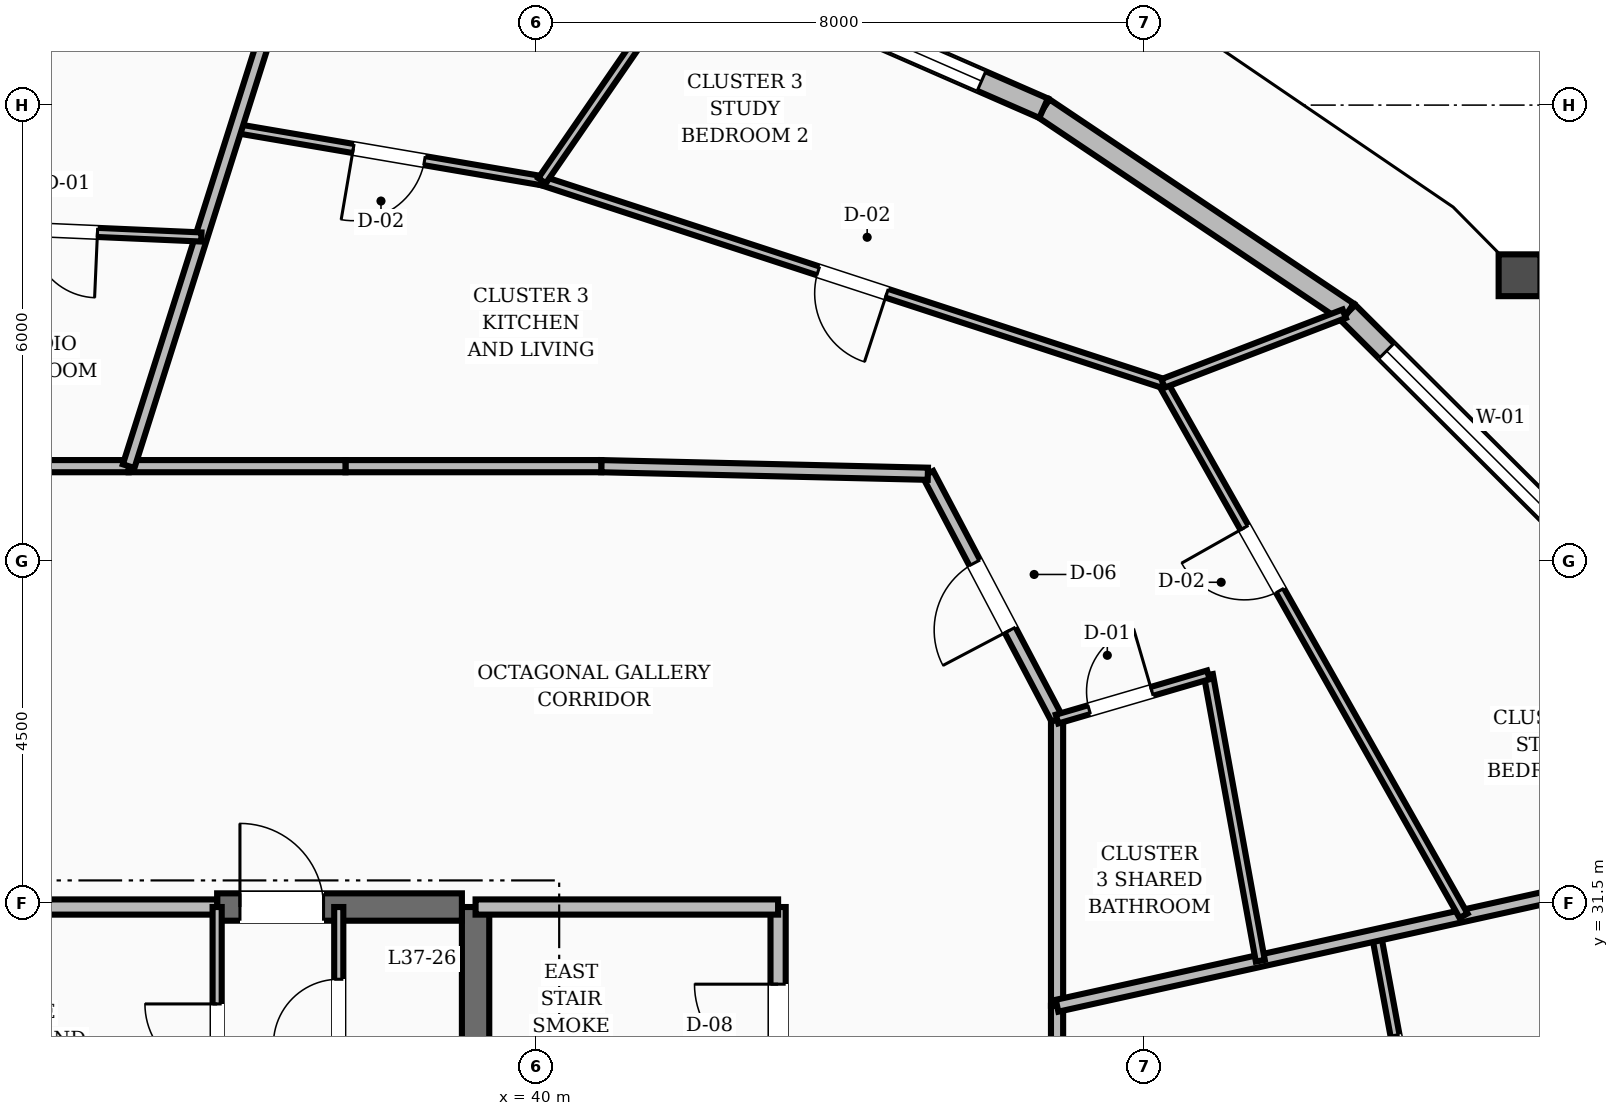
"""IFC4 building model, lengths in metres.
Left out: names, types, materials, properties, quantities, classifications, styles, units other than length and angle.
Written with IfcOpenShell. Run it as: python <this file> out.ifc"""

import sys

from ifc_helpers import new_model, si_unit, direction, frame, frame_2d, origin, place, context, subcontext, project, spatial, rectangle, extrude, element, fill, save


model = new_model("IFC4")
c1 = context("Model", 3, precision=1e-05, world=origin(), true_north=direction((0.0, 1.0)))
c2 = subcontext(c1, "Body", "Model", "MODEL_VIEW")
j1 = project(units=[si_unit("LENGTHUNIT", "METRE"), si_unit("PLANEANGLEUNIT", "RADIAN")], contexts=[c1])
p1 = place(None, origin())
s1 = spatial("IfcSite", under=j1, at=p1, CompositionType="ELEMENT")
p2 = place(p1, origin())
s2 = spatial("IfcBuilding", under=s1, at=p2, CompositionType="ELEMENT")
p3 = place(p2, frame((0.0, 0.0, 146.0)))
s3 = spatial("IfcBuildingStorey", under=s2, at=p3, CompositionType="ELEMENT", Elevation=146.0)
p4 = place(p3, frame((39.2, 25.15, 0.0), z_axis=(0.0, 0.0, 1.0), x_axis=(0.0, 1.0, 0.0)))
e1 = element("IfcWall", 1, at=p4, inside=s3, PredefinedType="SHEAR", context=c2, shape_type="SweptSolid", body=[
    extrude(rectangle(XDim=6.3, YDim=0.36, at=frame_2d((3.15, 0.0))), origin(), (0.0, 0.0, 1.0), 3.6),
])
p5 = place(p3, frame((35.8, 31.45, 0.0), z_axis=(0.0, 0.0, 1.0), x_axis=(1.0, 0.0, 0.0)))
e2 = element("IfcWall", 2, at=p5, inside=s3, PredefinedType="SHEAR", context=c2, shape_type="SweptSolid", body=[
    extrude(rectangle(XDim=3.22, YDim=0.36, at=frame_2d((1.61, 0.0))), origin(), (0.0, 0.0, 1.0), 3.6),
])
p6 = place(p5, frame((0.3, 0.0, 0.0)))
e3 = element("IfcOpeningElement", 3, at=p6, cuts=e2, PredefinedType="OPENING", context=c2, shape_type="SweptSolid", body=[
    extrude(rectangle(XDim=1.1, YDim=2.1, at=frame_2d((0.55, 1.05))), frame((0.0, 0.19, 0.0), z_axis=(0.0, -1.0, 0.0), x_axis=(1.0, 0.0, 0.0)), (0.0, 0.0, 1.0), 0.38),
])
p7 = place(p3, frame((53.959, 36.0, 0.0), z_axis=(0.0, 0.0, 1.0), x_axis=(-0.708343047993, 0.70586834917, 0.0)))
e4 = element("IfcWall", 4, at=p7, inside=s3, PredefinedType="STANDARD", context=c2, shape_type="SweptSolid", body=[
    extrude(rectangle(XDim=4.637, YDim=0.28, at=frame_2d((2.318, 0.0))), origin(), (0.0, 0.0, 1.0), 2.82),
])
p8 = place(p7, frame((0.719, 0.0, 0.8)))
e5 = element("IfcOpeningElement", 5, at=p8, cuts=e4, PredefinedType="OPENING", context=c2, shape_type="SweptSolid", body=[
    extrude(rectangle(XDim=3.2, YDim=1.65, at=frame_2d((1.6, 0.825))), frame((0.0, 0.15, 0.0), z_axis=(0.0, -1.0, 0.0), x_axis=(1.0, 0.0, 0.0)), (0.0, 0.0, 1.0), 0.3),
])
p9 = place(p3, frame((50.675, 39.273, 0.0), z_axis=(0.0, 0.0, 1.0), x_axis=(-0.830308520581, 0.557304010977, 0.0)))
e6 = element("IfcWall", 6, at=p9, inside=s3, PredefinedType="STANDARD", context=c2, shape_type="SweptSolid", body=[
    extrude(rectangle(XDim=4.82, YDim=0.28, at=frame_2d((2.41, 0.0))), origin(), (0.0, 0.0, 1.0), 2.82),
])
p10 = place(p3, frame((46.673, 41.959, 0.0), z_axis=(0.0, 0.0, 1.0), x_axis=(-0.916285475586, 0.400525813438, 0.0)))
e7 = element("IfcWall", 7, at=p10, inside=s3, PredefinedType="STANDARD", context=c2, shape_type="SweptSolid", body=[
    extrude(rectangle(XDim=4.983, YDim=0.28, at=frame_2d((2.492, 0.0))), origin(), (0.0, 0.0, 1.0), 2.82),
])
p11 = place(p10, frame((0.892, 0.0, 0.8)))
e8 = element("IfcOpeningElement", 8, at=p11, cuts=e7, PredefinedType="OPENING", context=c2, shape_type="SweptSolid", body=[
    extrude(rectangle(XDim=3.2, YDim=1.65, at=frame_2d((1.6, 0.825))), frame((0.0, 0.15, 0.0), z_axis=(0.0, -1.0, 0.0), x_axis=(1.0, 0.0, 0.0)), (0.0, 0.0, 1.0), 0.3),
])
p12 = place(p3, frame((43.18, 28.32, 0.0), z_axis=(0.0, 0.0, 1.0), x_axis=(0.0, 1.0, 0.0)))
e9 = element("IfcWall", 9, at=p12, inside=s3, PredefinedType="SOLIDWALL", context=c2, shape_type="SweptSolid", body=[
    extrude(rectangle(XDim=3.13, YDim=0.2, at=frame_2d((1.565, 0.0))), origin(), (0.0, 0.0, 1.0), 2.8),
])
p13 = place(p12, frame((1.015, 0.0, 0.0)))
e10 = element("IfcOpeningElement", 10, at=p13, cuts=e9, PredefinedType="OPENING", context=c2, shape_type="SweptSolid", body=[
    extrude(rectangle(XDim=1.1, YDim=2.1, at=frame_2d((0.55, 1.05))), frame((0.0, 0.11, 0.0), z_axis=(0.0, -1.0, 0.0), x_axis=(1.0, 0.0, 0.0)), (0.0, 0.0, 1.0), 0.22),
])
p14 = place(p3, frame((39.2, 31.45, 0.0), z_axis=(0.0, 0.0, 1.0), x_axis=(1.0, 0.0, 0.0)))
e11 = element("IfcWall", 11, at=p14, inside=s3, PredefinedType="SOLIDWALL", context=c2, shape_type="SweptSolid", body=[
    extrude(rectangle(XDim=3.98, YDim=0.2, at=frame_2d((1.99, 0.0))), origin(), (0.0, 0.0, 1.0), 2.8),
])
p15 = place(p3, frame((28.2, 31.45, 0.0), z_axis=(0.0, 0.0, 1.0), x_axis=(1.0, 0.0, 0.0)))
e12 = element("IfcWall", 12, at=p15, inside=s3, PredefinedType="SOLIDWALL", context=c2, shape_type="SweptSolid", body=[
    extrude(rectangle(XDim=7.6, YDim=0.2, at=frame_2d((3.8, 0.0))), origin(), (0.0, 0.0, 1.0), 2.8),
])
p16 = place(p15, frame((1.0, 0.0, 0.0)))
e13 = element("IfcOpeningElement", 13, at=p16, cuts=e12, PredefinedType="OPENING", context=c2, shape_type="SweptSolid", body=[
    extrude(rectangle(XDim=0.95, YDim=2.1, at=frame_2d((0.475, 1.05))), frame((0.0, 0.11, 0.0), z_axis=(0.0, -1.0, 0.0), x_axis=(1.0, 0.0, 0.0)), (0.0, 0.0, 1.0), 0.22),
])
p17 = place(p3, frame((35.8, 27.95, 0.0), z_axis=(0.0, 0.0, 1.0), x_axis=(0.0, 1.0, 0.0)))
e14 = element("IfcWall", 14, at=p17, inside=s3, PredefinedType="PARTITIONING", context=c2, shape_type="SweptSolid", body=[
    extrude(rectangle(XDim=3.5, YDim=0.12, at=frame_2d((1.75, 0.0))), origin(), (0.0, 0.0, 1.0), 2.8),
])
p18 = place(p17, frame((1.275, 0.0, 0.0)))
e15 = element("IfcOpeningElement", 15, at=p18, cuts=e14, PredefinedType="OPENING", context=c2, shape_type="SweptSolid", body=[
    extrude(rectangle(XDim=0.95, YDim=2.1, at=frame_2d((0.475, 1.05))), frame((0.0, 0.07, 0.0), z_axis=(0.0, -1.0, 0.0), x_axis=(1.0, 0.0, 0.0)), (0.0, 0.0, 1.0), 0.14),
])
p19 = place(p3, frame((37.4, 25.25, 0.0), z_axis=(0.0, 0.0, 1.0), x_axis=(0.0, 1.0, 0.0)))
e16 = element("IfcWall", 16, at=p19, inside=s3, PredefinedType="PARTITIONING", context=c2, shape_type="SweptSolid", body=[
    extrude(rectangle(XDim=6.2, YDim=0.12, at=frame_2d((3.1, 0.0))), origin(), (0.0, 0.0, 1.0), 2.8),
])
p20 = place(p19, frame((0.44, 0.0, 0.0)))
e17 = element("IfcOpeningElement", 17, at=p20, cuts=e16, PredefinedType="OPENING", context=c2, shape_type="SweptSolid", body=[
    extrude(rectangle(XDim=0.86, YDim=2.1, at=frame_2d((0.43, 1.05))), frame((0.0, 0.07, 0.0), z_axis=(0.0, -1.0, 0.0), x_axis=(1.0, 0.0, 0.0)), (0.0, 0.0, 1.0), 0.14),
])
p21 = place(p19, frame((2.37, 0.0, 0.0)))
e18 = element("IfcOpeningElement", 18, at=p21, cuts=e16, PredefinedType="OPENING", context=c2, shape_type="SweptSolid", body=[
    extrude(rectangle(XDim=0.86, YDim=2.1, at=frame_2d((0.43, 1.05))), frame((0.0, 0.07, 0.0), z_axis=(0.0, -1.0, 0.0), x_axis=(1.0, 0.0, 0.0)), (0.0, 0.0, 1.0), 0.14),
])
p22 = place(p19, frame((4.39, 0.0, 0.0)))
e19 = element("IfcOpeningElement", 19, at=p22, cuts=e16, PredefinedType="OPENING", context=c2, shape_type="SweptSolid", body=[
    extrude(rectangle(XDim=0.86, YDim=2.1, at=frame_2d((0.43, 1.05))), frame((0.0, 0.07, 0.0), z_axis=(0.0, -1.0, 0.0), x_axis=(1.0, 0.0, 0.0)), (0.0, 0.0, 1.0), 0.14),
])
p23 = place(p3, frame((46.85, 26.954, 0.0), z_axis=(0.0, 0.0, 1.0), x_axis=(0.0, 1.0, 0.0)))
e20 = element("IfcWall", 20, at=p23, inside=s3, PredefinedType="SOLIDWALL", context=c2, shape_type="SweptSolid", body=[
    extrude(rectangle(XDim=3.197, YDim=0.16, at=frame_2d((1.599, 0.0))), origin(), (0.0, 0.0, 1.0), 2.8),
])
p24 = place(p3, frame((46.85, 30.151, 0.0), z_axis=(0.0, 0.0, 1.0), x_axis=(0.0, 1.0, 0.0)))
e21 = element("IfcWall", 21, at=p24, inside=s3, PredefinedType="SOLIDWALL", context=c2, shape_type="SweptSolid", body=[
    extrude(rectangle(XDim=3.771, YDim=0.16, at=frame_2d((1.886, 0.0))), origin(), (0.0, 0.0, 1.0), 2.8),
])
p25 = place(p3, frame((46.85, 33.923, 0.0), z_axis=(0.0, 0.0, 1.0), x_axis=(-0.466093963429, 0.884735224378, 0.0)))
e22 = element("IfcWall", 22, at=p25, inside=s3, PredefinedType="SOLIDWALL", context=c2, shape_type="SweptSolid", body=[
    extrude(rectangle(XDim=3.648, YDim=0.16, at=frame_2d((1.824, 0.0))), origin(), (0.0, 0.0, 1.0), 2.8),
])
p26 = place(p25, frame((1.324, 0.0, 0.0)))
e23 = element("IfcOpeningElement", 23, at=p26, cuts=e22, PredefinedType="OPENING", context=c2, shape_type="SweptSolid", body=[
    extrude(rectangle(XDim=1.0, YDim=2.1, at=frame_2d((0.5, 1.05))), frame((0.0, 0.09, 0.0), z_axis=(0.0, -1.0, 0.0), x_axis=(1.0, 0.0, 0.0)), (0.0, 0.0, 1.0), 0.18),
])
p27 = place(p3, frame((45.15, 37.15, 0.0), z_axis=(0.0, 0.0, 1.0), x_axis=(-0.999728709658, 0.023291781507, 0.0)))
e24 = element("IfcWall", 24, at=p27, inside=s3, PredefinedType="SOLIDWALL", context=c2, shape_type="SweptSolid", body=[
    extrude(rectangle(XDim=4.298, YDim=0.16, at=frame_2d((2.149, 0.0))), origin(), (0.0, 0.0, 1.0), 2.8),
])
p28 = place(p3, frame((40.854, 37.25, 0.0), z_axis=(0.0, 0.0, 1.0), x_axis=(-1.0, 0.0, 0.0)))
e25 = element("IfcWall", 25, at=p28, inside=s3, PredefinedType="SOLIDWALL", context=c2, shape_type="SweptSolid", body=[
    extrude(rectangle(XDim=3.365, YDim=0.16, at=frame_2d((1.683, 0.0))), origin(), (0.0, 0.0, 1.0), 2.8),
])
p29 = place(p3, frame((37.488, 37.25, 0.0), z_axis=(0.0, 0.0, 1.0), x_axis=(-1.0, 0.0, 0.0)))
e26 = element("IfcWall", 26, at=p29, inside=s3, PredefinedType="SOLIDWALL", context=c2, shape_type="SweptSolid", body=[
    extrude(rectangle(XDim=2.853, YDim=0.16, at=frame_2d((1.426, 0.0))), origin(), (0.0, 0.0, 1.0), 2.8),
])
p30 = place(p3, frame((34.635, 37.25, 0.0), z_axis=(0.0, 0.0, 1.0), x_axis=(-1.0, 0.0, 0.0)))
e27 = element("IfcWall", 27, at=p30, inside=s3, PredefinedType="SOLIDWALL", context=c2, shape_type="SweptSolid", body=[
    extrude(rectangle(XDim=2.635, YDim=0.16, at=frame_2d((1.318, 0.0))), origin(), (0.0, 0.0, 1.0), 2.8),
])
p31 = place(p3, frame((51.713, 27.508, 0.0), z_axis=(0.0, 0.0, 1.0), x_axis=(-0.182000245683, 0.983298484984, 0.0)))
e28 = element("IfcWall", 28, at=p31, inside=s3, PredefinedType="PARTITIONING", context=c2, shape_type="SweptSolid", body=[
    extrude(rectangle(XDim=3.634, YDim=0.12, at=frame_2d((1.817, 0.0))), origin(), (0.0, 0.0, 1.0), 2.8),
])
p32 = place(p31, frame((1.342, 0.0, 0.0)))
e29 = element("IfcOpeningElement", 29, at=p32, cuts=e28, PredefinedType="OPENING", context=c2, shape_type="SweptSolid", body=[
    extrude(rectangle(XDim=0.95, YDim=2.1, at=frame_2d((0.475, 1.05))), frame((0.0, 0.07, 0.0), z_axis=(0.0, -1.0, 0.0), x_axis=(1.0, 0.0, 0.0)), (0.0, 0.0, 1.0), 0.14),
])
p33 = place(p3, frame((46.85, 30.151, 0.0), z_axis=(0.0, 0.0, 1.0), x_axis=(0.976352651254, 0.216183950352, 0.0)))
e30 = element("IfcWall", 30, at=p33, inside=s3, PredefinedType="SOLIDWALL", context=c2, shape_type="SweptSolid", body=[
    extrude(rectangle(XDim=9.731, YDim=0.16, at=frame_2d((4.866, 0.0))), origin(), (0.0, 0.0, 1.0), 2.8),
])
p34 = place(p3, frame((49.524, 30.743, 0.0), z_axis=(0.0, 0.0, 1.0), x_axis=(-0.178705579988, 0.98390259461, 0.0)))
e31 = element("IfcWall", 31, at=p34, inside=s3, PredefinedType="PARTITIONING", context=c2, shape_type="SweptSolid", body=[
    extrude(rectangle(XDim=3.823, YDim=0.12, at=frame_2d((1.911, 0.0))), origin(), (0.0, 0.0, 1.0), 2.8),
])
p35 = place(p3, frame((46.85, 33.923, 0.0), z_axis=(0.0, 0.0, 1.0), x_axis=(0.959881252976, 0.280406811944, 0.0)))
e32 = element("IfcWall", 32, at=p35, inside=s3, PredefinedType="PARTITIONING", context=c2, shape_type="SweptSolid", body=[
    extrude(rectangle(XDim=2.074, YDim=0.12, at=frame_2d((1.037, 0.0))), origin(), (0.0, 0.0, 1.0), 2.8),
])
p36 = place(p35, frame((0.44, 0.0, 0.0)))
e33 = element("IfcOpeningElement", 33, at=p36, cuts=e32, PredefinedType="OPENING", context=c2, shape_type="SweptSolid", body=[
    extrude(rectangle(XDim=0.86, YDim=2.1, at=frame_2d((0.43, 1.05))), frame((0.0, 0.07, 0.0), z_axis=(0.0, -1.0, 0.0), x_axis=(1.0, 0.0, 0.0)), (0.0, 0.0, 1.0), 0.14),
])
p37 = place(p3, frame((52.198, 31.335, 0.0), z_axis=(0.0, 0.0, 1.0), x_axis=(-0.491634094676, 0.870801881574, 0.0)))
e34 = element("IfcWall", 34, at=p37, inside=s3, PredefinedType="PARTITIONING", context=c2, shape_type="SweptSolid", body=[
    extrude(rectangle(XDim=8.043, YDim=0.12, at=frame_2d((4.021, 0.0))), origin(), (0.0, 0.0, 1.0), 2.8),
])
p38 = place(p37, frame((4.913, 0.0, 0.0)))
e35 = element("IfcOpeningElement", 35, at=p38, cuts=e34, PredefinedType="OPENING", context=c2, shape_type="SweptSolid", body=[
    extrude(rectangle(XDim=0.95, YDim=2.1, at=frame_2d((0.475, 1.05))), frame((0.0, 0.07, 0.0), z_axis=(0.0, -1.0, 0.0), x_axis=(1.0, 0.0, 0.0)), (0.0, 0.0, 1.0), 0.14),
])
p39 = place(p3, frame((48.244, 38.339, 0.0), z_axis=(0.0, 0.0, 1.0), x_axis=(-0.950656085118, 0.310246688667, 0.0)))
e36 = element("IfcWall", 36, at=p39, inside=s3, PredefinedType="PARTITIONING", context=c2, shape_type="SweptSolid", body=[
    extrude(rectangle(XDim=8.593, YDim=0.12, at=frame_2d((4.297, 0.0))), origin(), (0.0, 0.0, 1.0), 2.8),
])
p40 = place(p39, frame((3.822, 0.0, 0.0)))
e37 = element("IfcOpeningElement", 37, at=p40, cuts=e36, PredefinedType="OPENING", context=c2, shape_type="SweptSolid", body=[
    extrude(rectangle(XDim=0.95, YDim=2.1, at=frame_2d((0.475, 1.05))), frame((0.0, 0.07, 0.0), z_axis=(0.0, -1.0, 0.0), x_axis=(1.0, 0.0, 0.0)), (0.0, 0.0, 1.0), 0.14),
])
p41 = place(p3, frame((48.244, 38.339, 0.0), z_axis=(0.0, 0.0, 1.0), x_axis=(0.933458867587, 0.358684460945, 0.0)))
e38 = element("IfcWall", 38, at=p41, inside=s3, PredefinedType="PARTITIONING", context=c2, shape_type="SweptSolid", body=[
    extrude(rectangle(XDim=2.554, YDim=0.12, at=frame_2d((1.277, 0.0))), origin(), (0.0, 0.0, 1.0), 2.8),
])
p42 = place(p3, frame((40.075, 41.005, 0.0), z_axis=(0.0, 0.0, 1.0), x_axis=(-0.985727483478, 0.16834882927, 0.0)))
e39 = element("IfcWall", 39, at=p42, inside=s3, PredefinedType="PARTITIONING", context=c2, shape_type="SweptSolid", body=[
    extrude(rectangle(XDim=4.088, YDim=0.12, at=frame_2d((2.044, 0.0))), origin(), (0.0, 0.0, 1.0), 2.8),
])
p43 = place(p42, frame((1.569, 0.0, 0.0)))
e40 = element("IfcOpeningElement", 40, at=p43, cuts=e39, PredefinedType="OPENING", context=c2, shape_type="SweptSolid", body=[
    extrude(rectangle(XDim=0.95, YDim=2.1, at=frame_2d((0.475, 1.05))), frame((0.0, 0.07, 0.0), z_axis=(0.0, -1.0, 0.0), x_axis=(1.0, 0.0, 0.0)), (0.0, 0.0, 1.0), 0.14),
])
p44 = place(p3, frame((40.075, 41.005, 0.0), z_axis=(0.0, 0.0, 1.0), x_axis=(0.56726774044, 0.8235334302, 0.0)))
e41 = element("IfcWall", 41, at=p44, inside=s3, PredefinedType="PARTITIONING", context=c2, shape_type="SweptSolid", body=[
    extrude(rectangle(XDim=3.532, YDim=0.12, at=frame_2d((1.766, 0.0))), origin(), (0.0, 0.0, 1.0), 2.8),
])
p45 = place(p3, frame((34.635, 37.25, 0.0), z_axis=(0.0, 0.0, 1.0), x_axis=(0.302358297893, 0.953194345186, 0.0)))
e42 = element("IfcWall", 42, at=p45, inside=s3, PredefinedType="SOLIDWALL", context=c2, shape_type="SweptSolid", body=[
    extrude(rectangle(XDim=8.274, YDim=0.16, at=frame_2d((4.137, 0.0))), origin(), (0.0, 0.0, 1.0), 2.8),
])
p46 = place(p3, frame((35.592, 40.265, 0.0), z_axis=(0.0, 0.0, 1.0), x_axis=(-0.999037490114, 0.043864488453, 0.0)))
e43 = element("IfcWall", 43, at=p46, inside=s3, PredefinedType="PARTITIONING", context=c2, shape_type="SweptSolid", body=[
    extrude(rectangle(XDim=3.595, YDim=0.12, at=frame_2d((1.798, 0.0))), origin(), (0.0, 0.0, 1.0), 2.8),
])
p47 = place(p46, frame((1.368, 0.0, 0.0)))
e44 = element("IfcOpeningElement", 44, at=p47, cuts=e43, PredefinedType="OPENING", context=c2, shape_type="SweptSolid", body=[
    extrude(rectangle(XDim=0.86, YDim=2.1, at=frame_2d((0.43, 1.05))), frame((0.0, 0.07, 0.0), z_axis=(0.0, -1.0, 0.0), x_axis=(1.0, 0.0, 0.0)), (0.0, 0.0, 1.0), 0.14),
])
p48 = place(p8, origin())
e45 = element("IfcWindow", 45, at=p48, inside=s3, PartitioningType="SINGLE_PANEL", PredefinedType="WINDOW", context=c2, shape_type="SweptSolid", body=[
    extrude(rectangle(XDim=3.2, YDim=1.65, at=frame_2d((1.6, 0.825))), frame((0.0, 0.03, 0.0), z_axis=(0.0, -1.0, 0.0), x_axis=(1.0, 0.0, 0.0)), (0.0, 0.0, 1.0), 0.06),
])
fill(e5, e45)
p49 = place(p11, origin())
e46 = element("IfcWindow", 46, at=p49, inside=s3, PartitioningType="SINGLE_PANEL", PredefinedType="WINDOW", context=c2, shape_type="SweptSolid", body=[
    extrude(rectangle(XDim=3.2, YDim=1.65, at=frame_2d((1.6, 0.825))), frame((0.0, 0.03, 0.0), z_axis=(0.0, -1.0, 0.0), x_axis=(1.0, 0.0, 0.0)), (0.0, 0.0, 1.0), 0.06),
])
fill(e8, e46)
p50 = place(p13, origin())
e47 = element("IfcDoor", 47, at=p50, inside=s3, OperationType="SINGLE_SWING_RIGHT", PredefinedType="DOOR", context=c2, shape_type="SweptSolid", body=[
    extrude(rectangle(XDim=1.1, YDim=2.1, at=frame_2d((0.55, 1.05))), frame((0.0, 0.025, 0.0), z_axis=(0.0, -1.0, 0.0), x_axis=(1.0, 0.0, 0.0)), (0.0, 0.0, 1.0), 0.05),
])
fill(e10, e47)
p51 = place(p6, origin())
e48 = element("IfcDoor", 48, at=p51, inside=s3, OperationType="SINGLE_SWING_LEFT", PredefinedType="DOOR", context=c2, shape_type="SweptSolid", body=[
    extrude(rectangle(XDim=1.1, YDim=2.1, at=frame_2d((0.55, 1.05))), frame((0.0, 0.025, 0.0), z_axis=(0.0, -1.0, 0.0), x_axis=(1.0, 0.0, 0.0)), (0.0, 0.0, 1.0), 0.05),
])
fill(e3, e48)
p52 = place(p18, origin())
e49 = element("IfcDoor", 49, at=p52, inside=s3, OperationType="SINGLE_SWING_RIGHT", PredefinedType="DOOR", context=c2, shape_type="SweptSolid", body=[
    extrude(rectangle(XDim=0.95, YDim=2.1, at=frame_2d((0.475, 1.05))), frame((0.0, 0.025, 0.0), z_axis=(0.0, -1.0, 0.0), x_axis=(1.0, 0.0, 0.0)), (0.0, 0.0, 1.0), 0.05),
])
fill(e15, e49)
p53 = place(p22, origin())
e50 = element("IfcDoor", 50, at=p53, inside=s3, OperationType="SINGLE_SWING_LEFT", PredefinedType="DOOR", context=c2, shape_type="SweptSolid", body=[
    extrude(rectangle(XDim=0.86, YDim=2.1, at=frame_2d((0.43, 1.05))), frame((0.0, 0.025, 0.0), z_axis=(0.0, -1.0, 0.0), x_axis=(1.0, 0.0, 0.0)), (0.0, 0.0, 1.0), 0.05),
])
fill(e19, e50)
p54 = place(p32, origin())
e51 = element("IfcDoor", 51, at=p54, inside=s3, OperationType="SINGLE_SWING_LEFT", PredefinedType="DOOR", context=c2, shape_type="SweptSolid", body=[
    extrude(rectangle(XDim=0.95, YDim=2.1, at=frame_2d((0.475, 1.05))), frame((0.0, 0.025, 0.0), z_axis=(0.0, -1.0, 0.0), x_axis=(1.0, 0.0, 0.0)), (0.0, 0.0, 1.0), 0.05),
])
fill(e29, e51)
p55 = place(p36, origin())
e52 = element("IfcDoor", 52, at=p55, inside=s3, OperationType="SINGLE_SWING_RIGHT", PredefinedType="DOOR", context=c2, shape_type="SweptSolid", body=[
    extrude(rectangle(XDim=0.86, YDim=2.1, at=frame_2d((0.43, 1.05))), frame((0.0, 0.025, 0.0), z_axis=(0.0, -1.0, 0.0), x_axis=(1.0, 0.0, 0.0)), (0.0, 0.0, 1.0), 0.05),
])
fill(e33, e52)
p56 = place(p26, origin())
e53 = element("IfcDoor", 53, at=p56, inside=s3, OperationType="SINGLE_SWING_LEFT", PredefinedType="DOOR", context=c2, shape_type="SweptSolid", body=[
    extrude(rectangle(XDim=1.0, YDim=2.1, at=frame_2d((0.5, 1.05))), frame((0.0, 0.025, 0.0), z_axis=(0.0, -1.0, 0.0), x_axis=(1.0, 0.0, 0.0)), (0.0, 0.0, 1.0), 0.05),
])
fill(e23, e53)
p57 = place(p38, origin())
e54 = element("IfcDoor", 54, at=p57, inside=s3, OperationType="SINGLE_SWING_RIGHT", PredefinedType="DOOR", context=c2, shape_type="SweptSolid", body=[
    extrude(rectangle(XDim=0.95, YDim=2.1, at=frame_2d((0.475, 1.05))), frame((0.0, 0.025, 0.0), z_axis=(0.0, -1.0, 0.0), x_axis=(1.0, 0.0, 0.0)), (0.0, 0.0, 1.0), 0.05),
])
fill(e35, e54)
p58 = place(p40, origin())
e55 = element("IfcDoor", 55, at=p58, inside=s3, OperationType="SINGLE_SWING_LEFT", PredefinedType="DOOR", context=c2, shape_type="SweptSolid", body=[
    extrude(rectangle(XDim=0.95, YDim=2.1, at=frame_2d((0.475, 1.05))), frame((0.0, 0.025, 0.0), z_axis=(0.0, -1.0, 0.0), x_axis=(1.0, 0.0, 0.0)), (0.0, 0.0, 1.0), 0.05),
])
fill(e37, e55)
p59 = place(p43, origin())
e56 = element("IfcDoor", 56, at=p59, inside=s3, OperationType="SINGLE_SWING_RIGHT", PredefinedType="DOOR", context=c2, shape_type="SweptSolid", body=[
    extrude(rectangle(XDim=0.95, YDim=2.1, at=frame_2d((0.475, 1.05))), frame((0.0, 0.025, 0.0), z_axis=(0.0, -1.0, 0.0), x_axis=(1.0, 0.0, 0.0)), (0.0, 0.0, 1.0), 0.05),
])
fill(e40, e56)
p60 = place(p47, origin())
e57 = element("IfcDoor", 57, at=p60, inside=s3, OperationType="SINGLE_SWING_LEFT", PredefinedType="DOOR", context=c2, shape_type="SweptSolid", body=[
    extrude(rectangle(XDim=0.86, YDim=2.1, at=frame_2d((0.43, 1.05))), frame((0.0, 0.025, 0.0), z_axis=(0.0, -1.0, 0.0), x_axis=(1.0, 0.0, 0.0)), (0.0, 0.0, 1.0), 0.05),
])
fill(e44, e57)
save(model, sys.argv[1])
